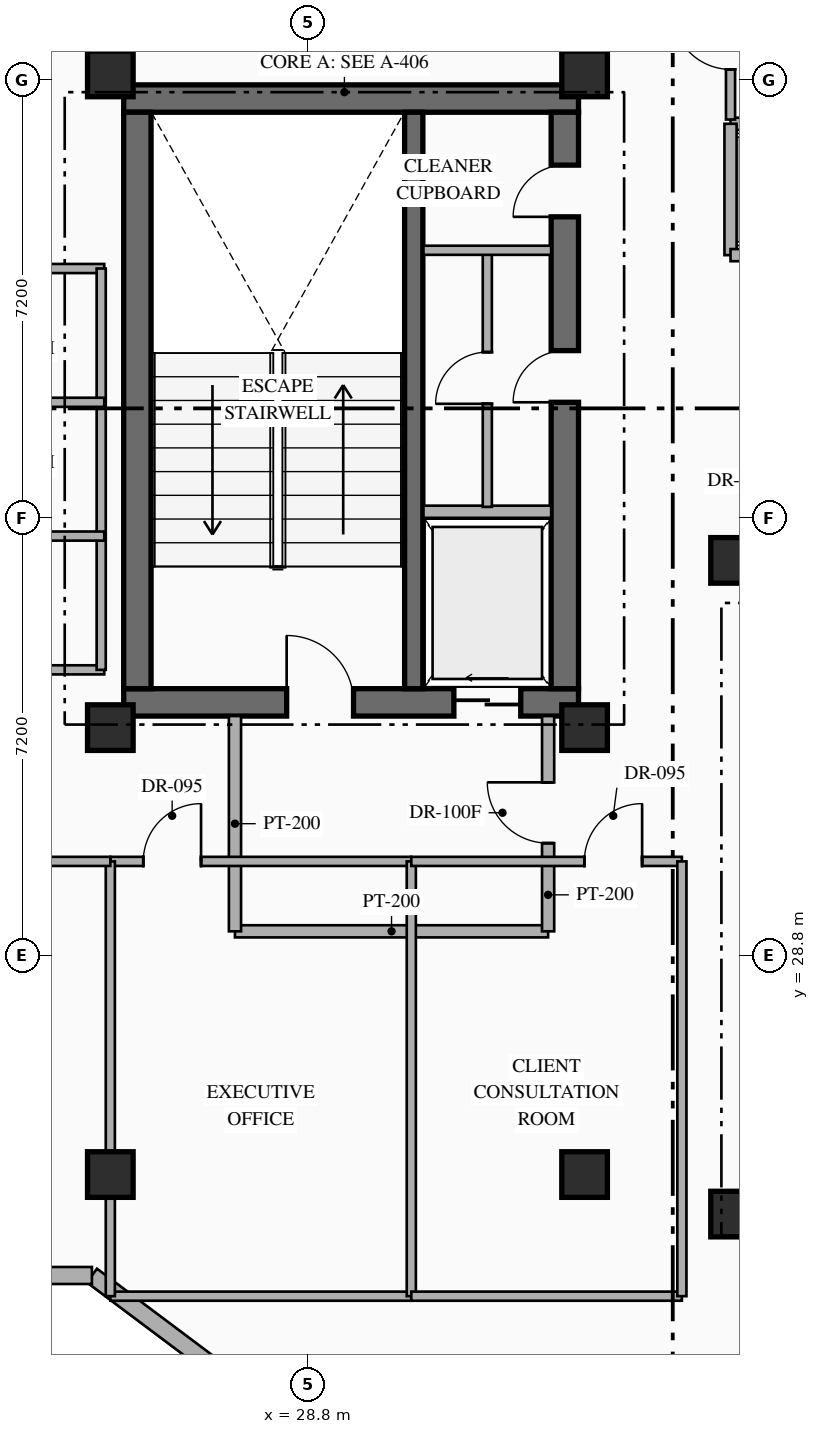
"""IFC4 building model, lengths in metres.
Left out: names, types, materials, properties, quantities, classifications, styles, units other than length and angle.
Written with IfcOpenShell. Run it as: python <this file> out.ifc"""

import sys

from ifc_helpers import new_model, si_unit, direction, frame, frame_2d, origin, origin_2d, place, context, subcontext, project, spatial, rectangle, hollow_rectangle, extrude, element, fill, save


model = new_model("IFC4")
c1 = context("Model", 3, precision=1e-05, world=origin(), true_north=direction((0.0, 1.0)))
c2 = subcontext(c1, "Body", "Model", "MODEL_VIEW")
j1 = project(units=[si_unit("LENGTHUNIT", "METRE"), si_unit("PLANEANGLEUNIT", "RADIAN")], contexts=[c1])
p1 = place(None, origin())
s1 = spatial("IfcSite", under=j1, at=p1, CompositionType="ELEMENT")
p2 = place(p1, origin())
s2 = spatial("IfcBuilding", under=s1, at=p2, CompositionType="ELEMENT")
p3 = place(p2, frame((0.0, 0.0, 198.75)))
s3 = spatial("IfcBuildingStorey", under=s2, at=p3, CompositionType="ELEMENT", Elevation=198.75)
p4 = place(p3, frame((25.77, 32.965, 0.0), z_axis=(0.0, 0.0, 1.0), x_axis=(1.0, 0.0, 0.0)))
e1 = element("IfcWall", 1, at=p4, inside=s3, PredefinedType="SHEAR", context=c2, shape_type="SweptSolid", body=[
    extrude(rectangle(XDim=7.48, YDim=0.45, at=frame_2d((3.74, 0.0))), origin(), (0.0, 0.0, 1.0), 3.6),
])
p5 = place(p4, frame((2.68, 0.0, 0.0)))
e2 = element("IfcOpeningElement", 2, at=p5, cuts=e1, PredefinedType="OPENING", context=c2, shape_type="SweptSolid", body=[
    extrude(rectangle(XDim=1.1, YDim=2.2, at=frame_2d((0.55, 1.1))), frame((0.0, 0.235, 0.0), z_axis=(0.0, -1.0, 0.0), x_axis=(1.0, 0.0, 0.0)), (0.0, 0.0, 1.0), 0.47),
])
p6 = place(p4, frame((5.43, 0.0, 0.0)))
e3 = element("IfcOpeningElement", 3, at=p6, cuts=e1, PredefinedType="OPENING", context=c2, shape_type="SweptSolid", body=[
    extrude(rectangle(XDim=1.1, YDim=2.15, at=frame_2d((0.55, 1.075))), frame((0.0, 0.235, 0.0), z_axis=(0.0, -1.0, 0.0), x_axis=(1.0, 0.0, 0.0)), (0.0, 0.0, 1.0), 0.47),
])
p7 = place(p3, frame((25.77, 42.895, 0.0), z_axis=(0.0, 0.0, 1.0), x_axis=(1.0, 0.0, 0.0)))
e4 = element("IfcWall", 4, at=p7, inside=s3, PredefinedType="SHEAR", context=c2, shape_type="SweptSolid", body=[
    extrude(rectangle(XDim=7.48, YDim=0.45, at=frame_2d((3.74, 0.0))), origin(), (0.0, 0.0, 1.0), 3.6),
])
p8 = place(p3, frame((25.995, 33.19, 0.0), z_axis=(0.0, 0.0, 1.0), x_axis=(0.0, 1.0, 0.0)))
e5 = element("IfcWall", 5, at=p8, inside=s3, PredefinedType="SHEAR", context=c2, shape_type="SweptSolid", body=[
    extrude(rectangle(XDim=9.48, YDim=0.45, at=frame_2d((4.74, 0.0))), origin(), (0.0, 0.0, 1.0), 3.6),
])
p9 = place(p3, frame((33.025, 33.19, 0.0), z_axis=(0.0, 0.0, 1.0), x_axis=(0.0, 1.0, 0.0)))
e6 = element("IfcWall", 6, at=p9, inside=s3, PredefinedType="SHEAR", context=c2, shape_type="SweptSolid", body=[
    extrude(rectangle(XDim=9.48, YDim=0.45, at=frame_2d((4.74, 0.0))), origin(), (0.0, 0.0, 1.0), 3.6),
])
p10 = place(p9, frame((4.71, 0.0, 0.0)))
e7 = element("IfcOpeningElement", 7, at=p10, cuts=e6, PredefinedType="OPENING", context=c2, shape_type="SweptSolid", body=[
    extrude(rectangle(XDim=0.85, YDim=2.08, at=frame_2d((0.425, 1.04))), frame((0.0, 0.235, 0.0), z_axis=(0.0, -1.0, 0.0), x_axis=(1.0, 0.0, 0.0)), (0.0, 0.0, 1.0), 0.47),
])
p11 = place(p9, frame((7.76, 0.0, 0.0)))
e8 = element("IfcOpeningElement", 8, at=p11, cuts=e6, PredefinedType="OPENING", context=c2, shape_type="SweptSolid", body=[
    extrude(rectangle(XDim=0.85, YDim=2.08, at=frame_2d((0.425, 1.04))), frame((0.0, 0.235, 0.0), z_axis=(0.0, -1.0, 0.0), x_axis=(1.0, 0.0, 0.0)), (0.0, 0.0, 1.0), 0.47),
])
p12 = place(p3, frame((30.54, 33.19, 0.0), z_axis=(0.0, 0.0, 1.0), x_axis=(0.0, 1.0, 0.0)))
e9 = element("IfcWall", 9, at=p12, inside=s3, PredefinedType="SHEAR", context=c2, shape_type="SweptSolid", body=[
    extrude(rectangle(XDim=9.48, YDim=0.3, at=frame_2d((4.74, 0.0))), origin(), (0.0, 0.0, 1.0), 3.6),
])
for number, where, z_axis, x_axis in (
    (10, (25.55, 32.55, 0.0), (0.0, 0.0, 1.0), (1.0, 0.0, 0.0)),
    (11, (33.35, 32.55, 0.0), (0.0, 0.0, 1.0), (1.0, 0.0, 0.0)),
    (12, (25.55, 43.3, 0.0), (0.0, 0.0, 1.0), (1.0, 0.0, 0.0)),
    (13, (33.35, 43.3, 0.0), (0.0, 0.0, 1.0), (1.0, 0.0, 0.0)),
    (14, (35.8, 24.55, 0.0), (0.0, 0.0, 1.0), (1.0, 0.0, 0.0)),
    (15, (35.8, 35.3, 0.0), (0.0, 0.0, 1.0), (1.0, 0.0, 0.0)),
    (16, (25.55, 25.2, 0.0), (0.0, 0.0, 1.0), (1.0, 0.0, 0.0)),
    (17, (33.35, 25.2, 0.0), (0.0, 0.0, 1.0), (1.0, 0.0, 0.0)),
):
    element("IfcColumn", number, at=place(p3, frame(where, z_axis=z_axis, x_axis=x_axis)), inside=s3, PredefinedType="COLUMN", context=c2, shape_type="SweptSolid", body=[
        extrude(hollow_rectangle(XDim=0.75, YDim=0.75, WallThickness=0.028, at=origin_2d()), origin(), (0.0, 0.0, 1.0), 3.6),
    ])
p13 = place(p3, frame((44.918, 8.787, 0.0), z_axis=(0.0, 0.0, 1.0), x_axis=(-0.800004765927, 0.599993645378, 0.0)))
e18 = element("IfcWall", 18, at=p13, inside=s3, PredefinedType="STANDARD", context=c2, shape_type="SweptSolid", body=[
    extrude(rectangle(XDim=24.588, YDim=0.28, at=frame_2d((12.294, 0.0))), origin(), (0.0, 0.0, 1.0), 3.35),
])
p14 = place(p3, frame((25.247, 23.54, 0.0), z_axis=(0.0, 0.0, 1.0), x_axis=(-1.0, 0.0, 0.0)))
e19 = element("IfcWall", 19, at=p14, inside=s3, PredefinedType="STANDARD", context=c2, shape_type="SweptSolid", body=[
    extrude(rectangle(XDim=4.789, YDim=0.28, at=frame_2d((2.395, 0.0))), origin(), (0.0, 0.0, 1.0), 3.35),
])
p15 = place(p3, frame((30.7, 36.1, 0.0), z_axis=(0.0, 0.0, 1.0), x_axis=(1.0, 0.0, 0.0)))
e20 = element("IfcWall", 20, at=p15, inside=s3, PredefinedType="STANDARD", context=c2, shape_type="SweptSolid", body=[
    extrude(rectangle(XDim=2.1, YDim=0.2, at=frame_2d((1.05, 0.0))), origin(), (0.0, 0.0, 1.0), 3.35),
])
p16 = place(p3, frame((31.75, 36.18, 0.0), z_axis=(0.0, 0.0, 1.0), x_axis=(0.0, 1.0, 0.0)))
e21 = element("IfcWall", 21, at=p16, inside=s3, PredefinedType="PARTITIONING", context=c2, shape_type="SweptSolid", body=[
    extrude(rectangle(XDim=4.24, YDim=0.15, at=frame_2d((2.12, 0.0))), origin(), (0.0, 0.0, 1.0), 3.35),
])
p17 = place(p16, frame((1.695, 0.0, 0.0)))
e22 = element("IfcOpeningElement", 22, at=p17, cuts=e21, PredefinedType="OPENING", context=c2, shape_type="SweptSolid", body=[
    extrude(rectangle(XDim=0.85, YDim=2.08, at=frame_2d((0.425, 1.04))), frame((0.0, 0.085, 0.0), z_axis=(0.0, -1.0, 0.0), x_axis=(1.0, 0.0, 0.0)), (0.0, 0.0, 1.0), 0.17),
])
p18 = place(p3, frame((30.7, 40.4, 0.0), z_axis=(0.0, 0.0, 1.0), x_axis=(1.0, 0.0, 0.0)))
e23 = element("IfcWall", 23, at=p18, inside=s3, PredefinedType="PARTITIONING", context=c2, shape_type="SweptSolid", body=[
    extrude(rectangle(XDim=2.1, YDim=0.15, at=frame_2d((1.05, 0.0))), origin(), (0.0, 0.0, 1.0), 3.35),
])
p19 = place(p3, frame((27.6, 29.2, 0.0), z_axis=(0.0, 0.0, 1.0), x_axis=(1.0, 0.0, 0.0)))
e24 = element("IfcWall", 24, at=p19, inside=s3, PredefinedType="STANDARD", context=c2, shape_type="SweptSolid", body=[
    extrude(rectangle(XDim=5.15, YDim=0.2, at=frame_2d((2.575, 0.0))), origin(), (0.0, 0.0, 1.0), 3.35),
])
p20 = place(p3, frame((27.6, 29.2, 0.0), z_axis=(0.0, 0.0, 1.0), x_axis=(0.0, 1.0, 0.0)))
e25 = element("IfcWall", 25, at=p20, inside=s3, PredefinedType="STANDARD", context=c2, shape_type="SweptSolid", body=[
    extrude(rectangle(XDim=3.54, YDim=0.2, at=frame_2d((1.77, 0.0))), origin(), (0.0, 0.0, 1.0), 3.35),
])
p21 = place(p3, frame((32.75, 29.2, 0.0), z_axis=(0.0, 0.0, 1.0), x_axis=(0.0, 1.0, 0.0)))
e26 = element("IfcWall", 26, at=p21, inside=s3, PredefinedType="STANDARD", context=c2, shape_type="SweptSolid", body=[
    extrude(rectangle(XDim=3.54, YDim=0.2, at=frame_2d((1.77, 0.0))), origin(), (0.0, 0.0, 1.0), 3.35),
])
p22 = place(p21, frame((1.45, 0.0, 0.0)))
e27 = element("IfcOpeningElement", 27, at=p22, cuts=e26, PredefinedType="OPENING", context=c2, shape_type="SweptSolid", body=[
    extrude(rectangle(XDim=1.0, YDim=2.2, at=frame_2d((0.5, 1.1))), frame((0.0, 0.11, 0.0), z_axis=(0.0, -1.0, 0.0), x_axis=(1.0, 0.0, 0.0)), (0.0, 0.0, 1.0), 0.22),
])
p23 = place(p3, frame((35.75, 42.48, 0.0), z_axis=(0.0, 0.0, 1.0), x_axis=(1.0, 0.0, 0.0)))
e28 = element("IfcWall", 28, at=p23, inside=s3, PredefinedType="STANDARD", context=c2, shape_type="SweptSolid", body=[
    extrude(rectangle(XDim=9.11, YDim=0.2, at=frame_2d((4.555, 0.0))), origin(), (0.0, 0.0, 1.0), 3.35),
])
p24 = place(p3, frame((35.75, 40.32, 0.0), z_axis=(0.0, 0.0, 1.0), x_axis=(0.0, 1.0, 0.0)))
e29 = element("IfcWall", 29, at=p24, inside=s3, PredefinedType="STANDARD", context=c2, shape_type="SweptSolid", body=[
    extrude(rectangle(XDim=2.16, YDim=0.2, at=frame_2d((1.08, 0.0))), origin(), (0.0, 0.0, 1.0), 3.35),
])
p25 = place(p3, frame((35.75, 40.32, 0.0), z_axis=(0.0, 0.0, 1.0), x_axis=(1.0, 0.0, 0.0)))
e30 = element("IfcWall", 30, at=p25, inside=s3, PredefinedType="STANDARD", context=c2, shape_type="SweptSolid", body=[
    extrude(rectangle(XDim=9.11, YDim=0.2, at=frame_2d((4.555, 0.0))), origin(), (0.0, 0.0, 1.0), 3.35),
])
p26 = place(p25, frame((0.53, 0.0, 0.0)))
e31 = element("IfcOpeningElement", 31, at=p26, cuts=e30, PredefinedType="OPENING", context=c2, shape_type="SweptSolid", body=[
    extrude(rectangle(XDim=1.1, YDim=2.18, at=frame_2d((0.55, 1.09))), frame((0.0, 0.11, 0.0), z_axis=(0.0, -1.0, 0.0), x_axis=(1.0, 0.0, 0.0)), (0.0, 0.0, 1.0), 0.22),
])
p27 = place(p25, frame((2.73, 0.0, 0.0)))
e32 = element("IfcOpeningElement", 32, at=p27, cuts=e30, PredefinedType="OPENING", context=c2, shape_type="SweptSolid", body=[
    extrude(rectangle(XDim=1.1, YDim=2.18, at=frame_2d((0.55, 1.09))), frame((0.0, 0.11, 0.0), z_axis=(0.0, -1.0, 0.0), x_axis=(1.0, 0.0, 0.0)), (0.0, 0.0, 1.0), 0.22),
])
p28 = place(p25, frame((4.93, 0.0, 0.0)))
e33 = element("IfcOpeningElement", 33, at=p28, cuts=e30, PredefinedType="OPENING", context=c2, shape_type="SweptSolid", body=[
    extrude(rectangle(XDim=1.1, YDim=2.18, at=frame_2d((0.55, 1.09))), frame((0.0, 0.11, 0.0), z_axis=(0.0, -1.0, 0.0), x_axis=(1.0, 0.0, 0.0)), (0.0, 0.0, 1.0), 0.22),
])
p29 = place(p25, frame((7.13, 0.0, 0.0)))
e34 = element("IfcOpeningElement", 34, at=p29, cuts=e30, PredefinedType="OPENING", context=c2, shape_type="SweptSolid", body=[
    extrude(rectangle(XDim=1.1, YDim=2.18, at=frame_2d((0.55, 1.09))), frame((0.0, 0.11, 0.0), z_axis=(0.0, -1.0, 0.0), x_axis=(1.0, 0.0, 0.0)), (0.0, 0.0, 1.0), 0.22),
])
for number, where, z_axis, x_axis in (
    (35, (22.15, 33.5, 0.0), (0.0, 0.0, 1.0), (1.0, 0.0, 0.0)),
    (36, (22.15, 40.1, 0.0), (0.0, 0.0, 1.0), (1.0, 0.0, 0.0)),
):
    element("IfcWall", number, at=place(p3, frame(where, z_axis=z_axis, x_axis=x_axis)), inside=s3, PredefinedType="PARTITIONING", context=c2, shape_type="SweptSolid", body=[
        extrude(rectangle(XDim=3.3, YDim=0.15, at=frame_2d((1.65, 0.0))), origin(), (0.0, 0.0, 1.0), 3.35),
    ])
p30 = place(p3, frame((25.4, 33.5, 0.0), z_axis=(0.0, 0.0, 1.0), x_axis=(0.0, 1.0, 0.0)))
e37 = element("IfcWall", 37, at=p30, inside=s3, PredefinedType="PARTITIONING", context=c2, shape_type="SweptSolid", body=[
    extrude(rectangle(XDim=6.6, YDim=0.15, at=frame_2d((3.3, 0.0))), origin(), (0.0, 0.0, 1.0), 3.35),
])
for number, where, z_axis, x_axis in (
    (38, (22.15, 35.7, 0.0), (0.0, 0.0, 1.0), (1.0, 0.0, 0.0)),
    (39, (22.15, 37.9, 0.0), (0.0, 0.0, 1.0), (1.0, 0.0, 0.0)),
):
    element("IfcWall", number, at=place(p3, frame(where, z_axis=z_axis, x_axis=x_axis)), inside=s3, PredefinedType="PARTITIONING", context=c2, shape_type="SweptSolid", body=[
        extrude(rectangle(XDim=3.3, YDim=0.15, at=frame_2d((1.65, 0.0))), origin(), (0.0, 0.0, 1.0), 3.35),
    ])
p31 = place(p3, frame((25.55, 23.2, 0.0), z_axis=(0.0, 0.0, 1.0), x_axis=(1.0, 0.0, 0.0)))
e40 = element("IfcWall", 40, at=p31, inside=s3, PredefinedType="PARTITIONING", context=c2, shape_type="SweptSolid", body=[
    extrude(rectangle(XDim=4.95, YDim=0.15, at=frame_2d((2.475, 0.0))), origin(), (0.0, 0.0, 1.0), 3.35),
])
p32 = place(p3, frame((25.55, 30.35, 0.0), z_axis=(0.0, 0.0, 1.0), x_axis=(1.0, 0.0, 0.0)))
e41 = element("IfcWall", 41, at=p32, inside=s3, PredefinedType="PARTITIONING", context=c2, shape_type="SweptSolid", body=[
    extrude(rectangle(XDim=4.95, YDim=0.15, at=frame_2d((2.475, 0.0))), origin(), (0.0, 0.0, 1.0), 3.35),
])
p33 = place(p32, frame((0.542, 0.0, 0.0)))
e42 = element("IfcOpeningElement", 42, at=p33, cuts=e41, PredefinedType="OPENING", context=c2, shape_type="SweptSolid", body=[
    extrude(rectangle(XDim=0.95, YDim=2.15, at=frame_2d((0.475, 1.075))), frame((0.0, 0.085, 0.0), z_axis=(0.0, -1.0, 0.0), x_axis=(1.0, 0.0, 0.0)), (0.0, 0.0, 1.0), 0.17),
])
p34 = place(p3, frame((25.55, 23.2, 0.0), z_axis=(0.0, 0.0, 1.0), x_axis=(0.0, 1.0, 0.0)))
e43 = element("IfcWall", 43, at=p34, inside=s3, PredefinedType="PARTITIONING", context=c2, shape_type="SweptSolid", body=[
    extrude(rectangle(XDim=7.15, YDim=0.15, at=frame_2d((3.575, 0.0))), origin(), (0.0, 0.0, 1.0), 2.757),
])
p35 = place(p3, frame((30.5, 23.2, 0.0), z_axis=(0.0, 0.0, 1.0), x_axis=(0.0, 1.0, 0.0)))
e44 = element("IfcWall", 44, at=p35, inside=s3, PredefinedType="PARTITIONING", context=c2, shape_type="SweptSolid", body=[
    extrude(rectangle(XDim=7.15, YDim=0.15, at=frame_2d((3.575, 0.0))), origin(), (0.0, 0.0, 1.0), 3.35),
])
p36 = place(p3, frame((30.5, 23.2, 0.0), z_axis=(0.0, 0.0, 1.0), x_axis=(1.0, 0.0, 0.0)))
e45 = element("IfcWall", 45, at=p36, inside=s3, PredefinedType="PARTITIONING", context=c2, shape_type="SweptSolid", body=[
    extrude(rectangle(XDim=4.45, YDim=0.15, at=frame_2d((2.225, 0.0))), origin(), (0.0, 0.0, 1.0), 3.35),
])
p37 = place(p3, frame((30.5, 30.35, 0.0), z_axis=(0.0, 0.0, 1.0), x_axis=(1.0, 0.0, 0.0)))
e46 = element("IfcWall", 46, at=p37, inside=s3, PredefinedType="PARTITIONING", context=c2, shape_type="SweptSolid", body=[
    extrude(rectangle(XDim=4.45, YDim=0.15, at=frame_2d((2.225, 0.0))), origin(), (0.0, 0.0, 1.0), 3.35),
])
p38 = place(p37, frame((2.846, 0.0, 0.0)))
e47 = element("IfcOpeningElement", 47, at=p38, cuts=e46, PredefinedType="OPENING", context=c2, shape_type="SweptSolid", body=[
    extrude(rectangle(XDim=0.95, YDim=2.15, at=frame_2d((0.475, 1.075))), frame((0.0, 0.085, 0.0), z_axis=(0.0, -1.0, 0.0), x_axis=(1.0, 0.0, 0.0)), (0.0, 0.0, 1.0), 0.17),
])
p39 = place(p3, frame((34.95, 23.2, 0.0), z_axis=(0.0, 0.0, 1.0), x_axis=(0.0, 1.0, 0.0)))
e48 = element("IfcWall", 48, at=p39, inside=s3, PredefinedType="PARTITIONING", context=c2, shape_type="SweptSolid", body=[
    extrude(rectangle(XDim=7.15, YDim=0.15, at=frame_2d((3.575, 0.0))), origin(), (0.0, 0.0, 1.0), 3.35),
])
p40 = place(p3, frame((22.25, 30.35, 0.0), z_axis=(0.0, 0.0, 1.0), x_axis=(1.0, 0.0, 0.0)))
e49 = element("IfcWall", 49, at=p40, inside=s3, PredefinedType="PARTITIONING", context=c2, shape_type="SweptSolid", body=[
    extrude(rectangle(XDim=3.3, YDim=0.15, at=frame_2d((1.65, 0.0))), origin(), (0.0, 0.0, 1.0), 3.35),
])
p41 = place(p40, frame((1.175, 0.0, 0.0)))
e50 = element("IfcOpeningElement", 50, at=p41, cuts=e49, PredefinedType="OPENING", context=c2, shape_type="SweptSolid", body=[
    extrude(rectangle(XDim=0.95, YDim=2.15, at=frame_2d((0.475, 1.075))), frame((0.0, 0.085, 0.0), z_axis=(0.0, -1.0, 0.0), x_axis=(1.0, 0.0, 0.0)), (0.0, 0.0, 1.0), 0.17),
])
p42 = place(p3, frame((35.75, 42.55, 0.0), z_axis=(0.0, 0.0, 1.0), x_axis=(0.0, 1.0, 0.0)))
e51 = element("IfcWall", 51, at=p42, inside=s3, PredefinedType="PARTITIONING", context=c2, shape_type="SweptSolid", body=[
    extrude(rectangle(XDim=2.6, YDim=0.15, at=frame_2d((1.3, 0.0))), origin(), (0.0, 0.0, 1.0), 3.35),
])
p43 = place(p42, frame((0.825, 0.0, 0.0)))
e52 = element("IfcOpeningElement", 52, at=p43, cuts=e51, PredefinedType="OPENING", context=c2, shape_type="SweptSolid", body=[
    extrude(rectangle(XDim=0.95, YDim=2.15, at=frame_2d((0.475, 1.075))), frame((0.0, 0.085, 0.0), z_axis=(0.0, -1.0, 0.0), x_axis=(1.0, 0.0, 0.0)), (0.0, 0.0, 1.0), 0.17),
])
p44 = place(p5, origin())
e53 = element("IfcDoor", 53, at=p44, inside=s3, OperationType="SINGLE_SWING_LEFT", PredefinedType="DOOR", context=c2, shape_type="SweptSolid", body=[
    extrude(rectangle(XDim=1.1, YDim=2.2, at=frame_2d((0.55, 1.1))), frame((0.0, 0.025, 0.0), z_axis=(0.0, -1.0, 0.0), x_axis=(1.0, 0.0, 0.0)), (0.0, 0.0, 1.0), 0.05),
])
fill(e2, e53)
p45 = place(p6, origin())
e54 = element("IfcDoor", 54, at=p45, inside=s3, OperationType="SLIDING_TO_LEFT", PredefinedType="USERDEFINED", context=c2, shape_type="SweptSolid", body=[
    extrude(rectangle(XDim=1.1, YDim=2.15, at=frame_2d((0.55, 1.075))), frame((0.0, 0.025, 0.0), z_axis=(0.0, -1.0, 0.0), x_axis=(1.0, 0.0, 0.0)), (0.0, 0.0, 1.0), 0.05),
])
fill(e3, e54)
p46 = place(p10, origin())
e55 = element("IfcDoor", 55, at=p46, inside=s3, OperationType="SINGLE_SWING_LEFT", PredefinedType="DOOR", context=c2, shape_type="SweptSolid", body=[
    extrude(rectangle(XDim=0.85, YDim=2.08, at=frame_2d((0.425, 1.04))), frame((0.0, 0.025, 0.0), z_axis=(0.0, -1.0, 0.0), x_axis=(1.0, 0.0, 0.0)), (0.0, 0.0, 1.0), 0.05),
])
fill(e7, e55)
p47 = place(p11, origin())
e56 = element("IfcDoor", 56, at=p47, inside=s3, OperationType="SINGLE_SWING_LEFT", PredefinedType="DOOR", context=c2, shape_type="SweptSolid", body=[
    extrude(rectangle(XDim=0.85, YDim=2.08, at=frame_2d((0.425, 1.04))), frame((0.0, 0.025, 0.0), z_axis=(0.0, -1.0, 0.0), x_axis=(1.0, 0.0, 0.0)), (0.0, 0.0, 1.0), 0.05),
])
fill(e8, e56)
p48 = place(p17, origin())
e57 = element("IfcDoor", 57, at=p48, inside=s3, OperationType="SINGLE_SWING_LEFT", PredefinedType="DOOR", context=c2, shape_type="SweptSolid", body=[
    extrude(rectangle(XDim=0.85, YDim=2.08, at=frame_2d((0.425, 1.04))), frame((0.0, 0.025, 0.0), z_axis=(0.0, -1.0, 0.0), x_axis=(1.0, 0.0, 0.0)), (0.0, 0.0, 1.0), 0.05),
])
fill(e22, e57)
p49 = place(p22, origin())
e58 = element("IfcDoor", 58, at=p49, inside=s3, OperationType="SINGLE_SWING_RIGHT", PredefinedType="DOOR", context=c2, shape_type="SweptSolid", body=[
    extrude(rectangle(XDim=1.0, YDim=2.2, at=frame_2d((0.5, 1.1))), frame((0.0, 0.025, 0.0), z_axis=(0.0, -1.0, 0.0), x_axis=(1.0, 0.0, 0.0)), (0.0, 0.0, 1.0), 0.05),
])
fill(e27, e58)
p50 = place(p33, origin())
e59 = element("IfcDoor", 59, at=p50, inside=s3, OperationType="SINGLE_SWING_RIGHT", PredefinedType="DOOR", context=c2, shape_type="SweptSolid", body=[
    extrude(rectangle(XDim=0.95, YDim=2.15, at=frame_2d((0.475, 1.075))), frame((0.0, 0.025, 0.0), z_axis=(0.0, -1.0, 0.0), x_axis=(1.0, 0.0, 0.0)), (0.0, 0.0, 1.0), 0.05),
])
fill(e42, e59)
p51 = place(p38, origin())
e60 = element("IfcDoor", 60, at=p51, inside=s3, OperationType="SINGLE_SWING_RIGHT", PredefinedType="DOOR", context=c2, shape_type="SweptSolid", body=[
    extrude(rectangle(XDim=0.95, YDim=2.15, at=frame_2d((0.475, 1.075))), frame((0.0, 0.025, 0.0), z_axis=(0.0, -1.0, 0.0), x_axis=(1.0, 0.0, 0.0)), (0.0, 0.0, 1.0), 0.05),
])
fill(e47, e60)
p52 = place(p43, origin())
e61 = element("IfcDoor", 61, at=p52, inside=s3, OperationType="SINGLE_SWING_RIGHT", PredefinedType="DOOR", context=c2, shape_type="SweptSolid", body=[
    extrude(rectangle(XDim=0.95, YDim=2.15, at=frame_2d((0.475, 1.075))), frame((0.0, 0.025, 0.0), z_axis=(0.0, -1.0, 0.0), x_axis=(1.0, 0.0, 0.0)), (0.0, 0.0, 1.0), 0.05),
])
fill(e52, e61)
save(model, sys.argv[1])
